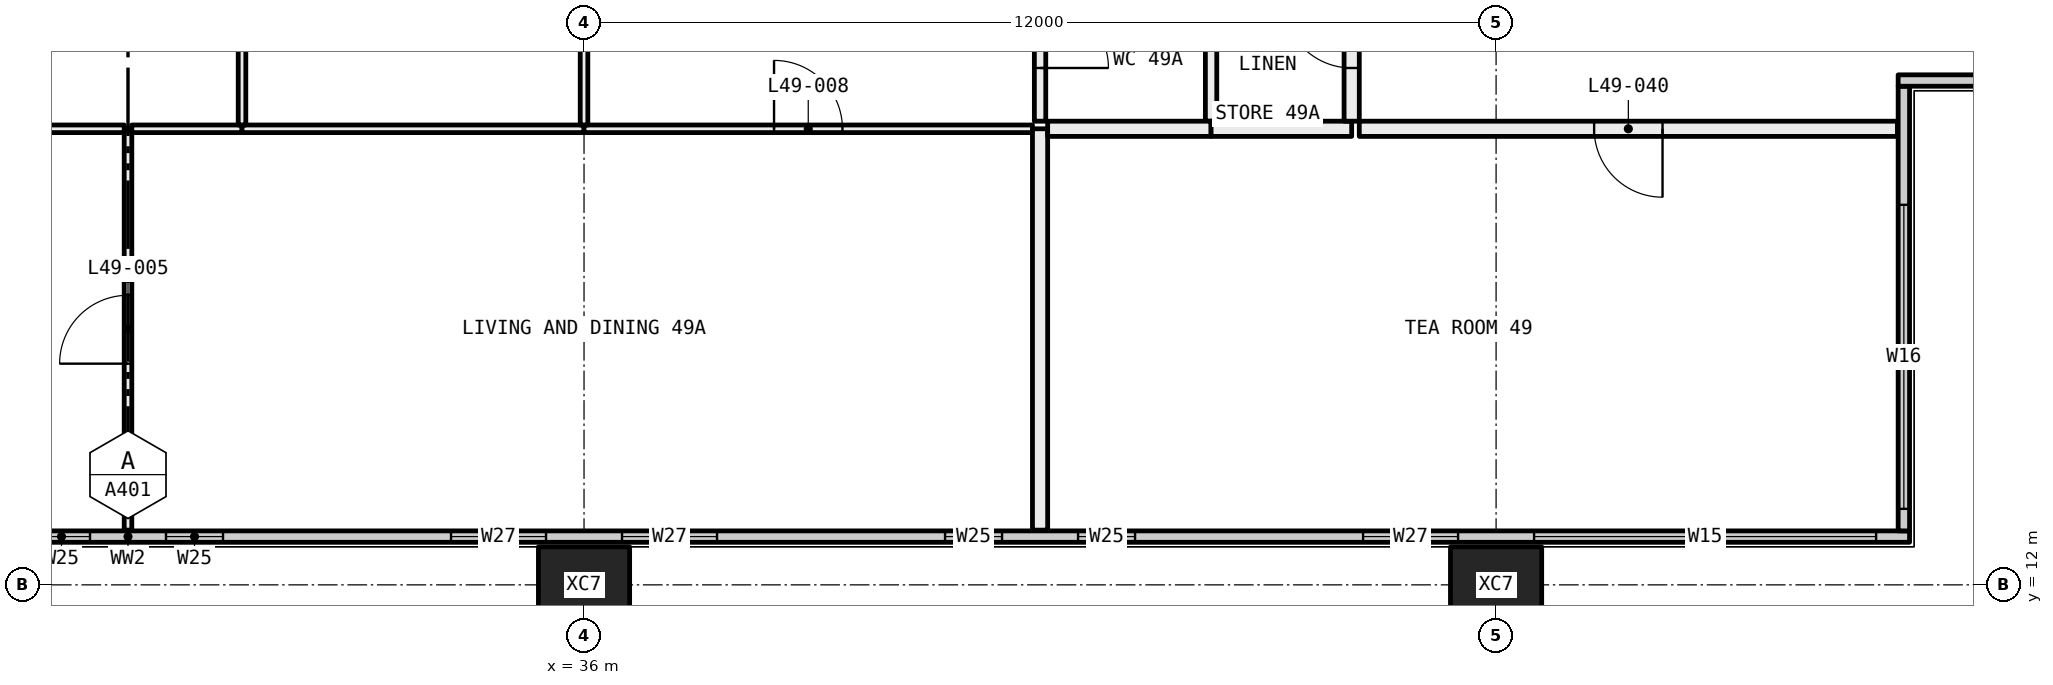
"""IFC4 building model, lengths in metres.
Left out: names, types, materials, properties, quantities, classifications, styles, units other than length and angle.
Written with IfcOpenShell. Run it as: python <this file> out.ifc"""

import sys

from ifc_helpers import new_model, si_unit, direction, frame, frame_2d, origin, origin_2d, place, context, subcontext, project, spatial, rectangle, hollow_rectangle, extrude, element, fill, save


model = new_model("IFC4")
c1 = context("Model", 3, precision=1e-05, world=origin(), true_north=direction((0.0, 1.0)))
c2 = subcontext(c1, "Body", "Model", "MODEL_VIEW")
j1 = project(units=[si_unit("LENGTHUNIT", "METRE"), si_unit("PLANEANGLEUNIT", "RADIAN")], contexts=[c1])
p1 = place(None, origin())
s1 = spatial("IfcSite", under=j1, at=p1, CompositionType="ELEMENT")
p2 = place(p1, origin())
s2 = spatial("IfcBuilding", under=s1, at=p2, CompositionType="ELEMENT")
p3 = place(p2, frame((0.0, 0.0, 185.85)))
s3 = spatial("IfcBuildingStorey", under=s2, at=p3, CompositionType="ELEMENT", Elevation=185.85)
for number, where, z_axis, x_axis in (
    (1, (36.0, 12.0, -0.4), (0.0, 0.0, 1.0), (1.0, 0.0, 0.0)),
    (2, (48.0, 12.0, -0.4), (0.0, 0.0, 1.0), (1.0, 0.0, 0.0)),
):
    element("IfcColumn", number, at=place(p3, frame(where, z_axis=z_axis, x_axis=x_axis)), inside=s3, PredefinedType="COLUMN", context=c2, shape_type="SweptSolid", body=[
        extrude(hollow_rectangle(XDim=1.2, YDim=1.0, WallThickness=0.045, at=origin_2d()), origin(), (0.0, 0.0, 1.0), 3.45),
    ])
p4 = place(p3, frame((6.56, 12.635, 0.0), z_axis=(0.0, 0.0, 1.0), x_axis=(1.0, 0.0, 0.0)))
e3 = element("IfcWall", 3, at=p4, inside=s3, PredefinedType="ELEMENTEDWALL", context=c2, shape_type="SweptSolid", body=[
    extrude(rectangle(XDim=46.88, YDim=0.15, at=frame_2d((23.44, 0.0))), origin(), (0.0, 0.0, 1.0), 3.05),
])
p5 = place(p4, frame((0.44, 0.0, 0.45)))
e4 = element("IfcOpeningElement", 4, at=p5, cuts=e3, PredefinedType="OPENING", context=c2, shape_type="SweptSolid", body=[
    extrude(rectangle(XDim=4.5, YDim=2.55, at=frame_2d((2.25, 1.275))), frame((0.0, 0.085, 0.0), z_axis=(0.0, -1.0, 0.0), x_axis=(1.0, 0.0, 0.0)), (0.0, 0.0, 1.0), 0.17),
])
p6 = place(p4, frame((5.94, 0.0, 0.45)))
e5 = element("IfcOpeningElement", 5, at=p6, cuts=e3, PredefinedType="OPENING", context=c2, shape_type="SweptSolid", body=[
    extrude(rectangle(XDim=1.25, YDim=2.55, at=frame_2d((0.625, 1.275))), frame((0.0, 0.085, 0.0), z_axis=(0.0, -1.0, 0.0), x_axis=(1.0, 0.0, 0.0)), (0.0, 0.0, 1.0), 0.17),
])
p7 = place(p4, frame((10.19, 0.0, 0.45)))
e6 = element("IfcOpeningElement", 6, at=p7, cuts=e3, PredefinedType="OPENING", context=c2, shape_type="SweptSolid", body=[
    extrude(rectangle(XDim=0.75, YDim=2.55, at=frame_2d((0.375, 1.275))), frame((0.0, 0.085, 0.0), z_axis=(0.0, -1.0, 0.0), x_axis=(1.0, 0.0, 0.0)), (0.0, 0.0, 1.0), 0.17),
])
p8 = place(p4, frame((11.94, 0.0, 0.45)))
e7 = element("IfcOpeningElement", 7, at=p8, cuts=e3, PredefinedType="OPENING", context=c2, shape_type="SweptSolid", body=[
    extrude(rectangle(XDim=0.75, YDim=2.55, at=frame_2d((0.375, 1.275))), frame((0.0, 0.085, 0.0), z_axis=(0.0, -1.0, 0.0), x_axis=(1.0, 0.0, 0.0)), (0.0, 0.0, 1.0), 0.17),
])
p9 = place(p4, frame((15.69, 0.0, 0.45)))
e8 = element("IfcOpeningElement", 8, at=p9, cuts=e3, PredefinedType="OPENING", context=c2, shape_type="SweptSolid", body=[
    extrude(rectangle(XDim=1.25, YDim=2.55, at=frame_2d((0.625, 1.275))), frame((0.0, 0.085, 0.0), z_axis=(0.0, -1.0, 0.0), x_axis=(1.0, 0.0, 0.0)), (0.0, 0.0, 1.0), 0.17),
])
p10 = place(p4, frame((17.94, 0.0, 0.45)))
e9 = element("IfcOpeningElement", 9, at=p10, cuts=e3, PredefinedType="OPENING", context=c2, shape_type="SweptSolid", body=[
    extrude(rectangle(XDim=1.25, YDim=2.55, at=frame_2d((0.625, 1.275))), frame((0.0, 0.085, 0.0), z_axis=(0.0, -1.0, 0.0), x_axis=(1.0, 0.0, 0.0)), (0.0, 0.0, 1.0), 0.17),
])
p11 = place(p4, frame((22.19, 0.0, 0.45)))
e10 = element("IfcOpeningElement", 10, at=p11, cuts=e3, PredefinedType="OPENING", context=c2, shape_type="SweptSolid", body=[
    extrude(rectangle(XDim=0.75, YDim=2.55, at=frame_2d((0.375, 1.275))), frame((0.0, 0.085, 0.0), z_axis=(0.0, -1.0, 0.0), x_axis=(1.0, 0.0, 0.0)), (0.0, 0.0, 1.0), 0.17),
])
p12 = place(p4, frame((23.94, 0.0, 0.45)))
e11 = element("IfcOpeningElement", 11, at=p12, cuts=e3, PredefinedType="OPENING", context=c2, shape_type="SweptSolid", body=[
    extrude(rectangle(XDim=0.75, YDim=2.55, at=frame_2d((0.375, 1.275))), frame((0.0, 0.085, 0.0), z_axis=(0.0, -1.0, 0.0), x_axis=(1.0, 0.0, 0.0)), (0.0, 0.0, 1.0), 0.17),
])
p13 = place(p4, frame((27.69, 0.0, 0.45)))
e12 = element("IfcOpeningElement", 12, at=p13, cuts=e3, PredefinedType="OPENING", context=c2, shape_type="SweptSolid", body=[
    extrude(rectangle(XDim=1.25, YDim=2.55, at=frame_2d((0.625, 1.275))), frame((0.0, 0.085, 0.0), z_axis=(0.0, -1.0, 0.0), x_axis=(1.0, 0.0, 0.0)), (0.0, 0.0, 1.0), 0.17),
])
p14 = place(p4, frame((29.94, 0.0, 0.45)))
e13 = element("IfcOpeningElement", 13, at=p14, cuts=e3, PredefinedType="OPENING", context=c2, shape_type="SweptSolid", body=[
    extrude(rectangle(XDim=1.25, YDim=2.55, at=frame_2d((0.625, 1.275))), frame((0.0, 0.085, 0.0), z_axis=(0.0, -1.0, 0.0), x_axis=(1.0, 0.0, 0.0)), (0.0, 0.0, 1.0), 0.17),
])
p15 = place(p4, frame((34.19, 0.0, 0.45)))
e14 = element("IfcOpeningElement", 14, at=p15, cuts=e3, PredefinedType="OPENING", context=c2, shape_type="SweptSolid", body=[
    extrude(rectangle(XDim=0.75, YDim=2.55, at=frame_2d((0.375, 1.275))), frame((0.0, 0.085, 0.0), z_axis=(0.0, -1.0, 0.0), x_axis=(1.0, 0.0, 0.0)), (0.0, 0.0, 1.0), 0.17),
])
p16 = place(p4, frame((35.94, 0.0, 0.45)))
e15 = element("IfcOpeningElement", 15, at=p16, cuts=e3, PredefinedType="OPENING", context=c2, shape_type="SweptSolid", body=[
    extrude(rectangle(XDim=0.75, YDim=2.55, at=frame_2d((0.375, 1.275))), frame((0.0, 0.085, 0.0), z_axis=(0.0, -1.0, 0.0), x_axis=(1.0, 0.0, 0.0)), (0.0, 0.0, 1.0), 0.17),
])
p17 = place(p4, frame((39.69, 0.0, 0.45)))
e16 = element("IfcOpeningElement", 16, at=p17, cuts=e3, PredefinedType="OPENING", context=c2, shape_type="SweptSolid", body=[
    extrude(rectangle(XDim=1.25, YDim=2.55, at=frame_2d((0.625, 1.275))), frame((0.0, 0.085, 0.0), z_axis=(0.0, -1.0, 0.0), x_axis=(1.0, 0.0, 0.0)), (0.0, 0.0, 1.0), 0.17),
])
p18 = place(p4, frame((41.94, 0.0, 0.45)))
e17 = element("IfcOpeningElement", 17, at=p18, cuts=e3, PredefinedType="OPENING", context=c2, shape_type="SweptSolid", body=[
    extrude(rectangle(XDim=4.5, YDim=2.55, at=frame_2d((2.25, 1.275))), frame((0.0, 0.085, 0.0), z_axis=(0.0, -1.0, 0.0), x_axis=(1.0, 0.0, 0.0)), (0.0, 0.0, 1.0), 0.17),
])
p19 = place(p3, frame((53.365, 12.71, 0.0), z_axis=(0.0, 0.0, 1.0), x_axis=(0.0, 1.0, 0.0)))
e18 = element("IfcWall", 18, at=p19, inside=s3, PredefinedType="ELEMENTEDWALL", context=c2, shape_type="SweptSolid", body=[
    extrude(rectangle(XDim=5.85, YDim=0.15, at=frame_2d((2.925, 0.0))), origin(), (0.0, 0.0, 1.0), 3.05),
])
p20 = place(p19, frame((0.29, 0.0, 0.45)))
e19 = element("IfcOpeningElement", 19, at=p20, cuts=e18, PredefinedType="OPENING", context=c2, shape_type="SweptSolid", body=[
    extrude(rectangle(XDim=4.0, YDim=2.55, at=frame_2d((2.0, 1.275))), frame((0.0, 0.085, 0.0), z_axis=(0.0, -1.0, 0.0), x_axis=(1.0, 0.0, 0.0)), (0.0, 0.0, 1.0), 0.17),
])
p21 = place(p3, frame((53.29, 18.635, 0.0), z_axis=(0.0, 0.0, 1.0), x_axis=(1.0, 0.0, 0.0)))
e20 = element("IfcWall", 20, at=p21, inside=s3, PredefinedType="ELEMENTEDWALL", context=c2, shape_type="SweptSolid", body=[
    extrude(rectangle(XDim=6.15, YDim=0.15, at=frame_2d((3.075, 0.0))), origin(), (0.0, 0.0, 1.0), 3.05),
])
p22 = place(p21, frame((1.71, 0.0, 0.45)))
e21 = element("IfcOpeningElement", 21, at=p22, cuts=e20, PredefinedType="OPENING", context=c2, shape_type="SweptSolid", body=[
    extrude(rectangle(XDim=4.0, YDim=2.55, at=frame_2d((2.0, 1.275))), frame((0.0, 0.085, 0.0), z_axis=(0.0, -1.0, 0.0), x_axis=(1.0, 0.0, 0.0)), (0.0, 0.0, 1.0), 0.17),
])
p23 = place(p3, frame((30.0, 12.72, 0.0), z_axis=(0.0, 0.0, 1.0), x_axis=(0.0, 1.0, 0.0)))
e22 = element("IfcWall", 22, at=p23, inside=s3, PredefinedType="PARTITIONING", context=c2, shape_type="SweptSolid", body=[
    extrude(rectangle(XDim=5.28, YDim=0.1, at=frame_2d((2.64, 0.0))), origin(), (0.0, 0.0, 1.0), 3.05),
])
p24 = place(p23, frame((2.19, 0.0, 0.0)))
e23 = element("IfcOpeningElement", 23, at=p24, cuts=e22, PredefinedType="OPENING", context=c2, shape_type="SweptSolid", body=[
    extrude(rectangle(XDim=0.9, YDim=2.1, at=frame_2d((0.45, 1.05))), frame((0.0, 0.06, 0.0), z_axis=(0.0, -1.0, 0.0), x_axis=(1.0, 0.0, 0.0)), (0.0, 0.0, 1.0), 0.12),
])
p25 = place(p3, frame((29.95, 18.0, 0.0), z_axis=(0.0, 0.0, 1.0), x_axis=(-1.0, 0.0, 0.0)))
e24 = element("IfcWall", 24, at=p25, inside=s3, PredefinedType="PARTITIONING", context=c2, shape_type="SweptSolid", body=[
    extrude(rectangle(XDim=3.95, YDim=0.1, at=frame_2d((1.975, 0.0))), origin(), (0.0, 0.0, 1.0), 3.05),
])
p26 = place(p25, frame((1.525, 0.0, 0.0)))
e25 = element("IfcOpeningElement", 25, at=p26, cuts=e24, PredefinedType="OPENING", context=c2, shape_type="SweptSolid", body=[
    extrude(rectangle(XDim=0.9, YDim=2.1, at=frame_2d((0.45, 1.05))), frame((0.0, 0.06, 0.0), z_axis=(0.0, -1.0, 0.0), x_axis=(1.0, 0.0, 0.0)), (0.0, 0.0, 1.0), 0.12),
])
p27 = place(p3, frame((31.5, 18.0, 0.0), z_axis=(0.0, 0.0, 1.0), x_axis=(-1.0, 0.0, 0.0)))
e26 = element("IfcWall", 26, at=p27, inside=s3, PredefinedType="PARTITIONING", context=c2, shape_type="SweptSolid", body=[
    extrude(rectangle(XDim=1.45, YDim=0.1, at=frame_2d((0.725, 0.0))), origin(), (0.0, 0.0, 1.0), 3.05),
])
p28 = place(p3, frame((36.0, 18.0, 0.0), z_axis=(0.0, 0.0, 1.0), x_axis=(-1.0, 0.0, 0.0)))
e27 = element("IfcWall", 27, at=p28, inside=s3, PredefinedType="PARTITIONING", context=c2, shape_type="SweptSolid", body=[
    extrude(rectangle(XDim=4.5, YDim=0.1, at=frame_2d((2.25, 0.0))), origin(), (0.0, 0.0, 1.0), 2.45),
])
p29 = place(p3, frame((41.9, 18.0, 0.0), z_axis=(0.0, 0.0, 1.0), x_axis=(-1.0, 0.0, 0.0)))
e28 = element("IfcWall", 28, at=p29, inside=s3, PredefinedType="PARTITIONING", context=c2, shape_type="SweptSolid", body=[
    extrude(rectangle(XDim=5.9, YDim=0.1, at=frame_2d((2.95, 0.0))), origin(), (0.0, 0.0, 1.0), 2.45),
])
p30 = place(p29, frame((2.5, 0.0, 0.0)))
e29 = element("IfcOpeningElement", 29, at=p30, cuts=e28, PredefinedType="OPENING", context=c2, shape_type="SweptSolid", body=[
    extrude(rectangle(XDim=0.9, YDim=2.1, at=frame_2d((0.45, 1.05))), frame((0.0, 0.06, 0.0), z_axis=(0.0, -1.0, 0.0), x_axis=(1.0, 0.0, 0.0)), (0.0, 0.0, 1.0), 0.12),
])
p31 = place(p3, frame((42.0, 12.72, 0.0), z_axis=(0.0, 0.0, 1.0), x_axis=(0.0, 1.0, 0.0)))
e30 = element("IfcWall", 30, at=p31, inside=s3, PredefinedType="PARTITIONING", context=c2, shape_type="SweptSolid", body=[
    extrude(rectangle(XDim=5.28, YDim=0.2, at=frame_2d((2.64, 0.0))), origin(), (0.0, 0.0, 1.0), 3.05),
])
p32 = place(p3, frame((31.5, 18.05, 0.0), z_axis=(0.0, 0.0, 1.0), x_axis=(0.0, 1.0, 0.0)))
e31 = element("IfcWall", 31, at=p32, inside=s3, PredefinedType="PARTITIONING", context=c2, shape_type="SweptSolid", body=[
    extrude(rectangle(XDim=6.25, YDim=0.1, at=frame_2d((3.125, 0.0))), origin(), (0.0, 0.0, 1.0), 2.45),
])
p33 = place(p32, frame((2.675, 0.0, 0.0)))
e32 = element("IfcOpeningElement", 32, at=p33, cuts=e31, PredefinedType="OPENING", context=c2, shape_type="SweptSolid", body=[
    extrude(rectangle(XDim=0.9, YDim=2.1, at=frame_2d((0.45, 1.05))), frame((0.0, 0.06, 0.0), z_axis=(0.0, -1.0, 0.0), x_axis=(1.0, 0.0, 0.0)), (0.0, 0.0, 1.0), 0.12),
])
p34 = place(p3, frame((36.0, 18.05, 0.0), z_axis=(0.0, 0.0, 1.0), x_axis=(0.0, 1.0, 0.0)))
e33 = element("IfcWall", 33, at=p34, inside=s3, PredefinedType="PARTITIONING", context=c2, shape_type="SweptSolid", body=[
    extrude(rectangle(XDim=5.3, YDim=0.1, at=frame_2d((2.65, 0.0))), origin(), (0.0, 0.0, 1.0), 2.45),
])
p35 = place(p3, frame((42.0, 18.1, 0.0), z_axis=(0.0, 0.0, 1.0), x_axis=(0.0, 1.0, 0.0)))
e34 = element("IfcWall", 34, at=p35, inside=s3, PredefinedType="PARTITIONING", context=c2, shape_type="SweptSolid", body=[
    extrude(rectangle(XDim=2.3, YDim=0.15, at=frame_2d((1.15, 0.0))), origin(), (0.0, 0.0, 1.0), 3.05),
])
p36 = place(p35, frame((0.7, 0.0, 0.0)))
e35 = element("IfcOpeningElement", 35, at=p36, cuts=e34, PredefinedType="OPENING", context=c2, shape_type="SweptSolid", body=[
    extrude(rectangle(XDim=0.9, YDim=2.1, at=frame_2d((0.45, 1.05))), frame((0.0, 0.085, 0.0), z_axis=(0.0, -1.0, 0.0), x_axis=(1.0, 0.0, 0.0)), (0.0, 0.0, 1.0), 0.17),
])
p37 = place(p3, frame((44.25, 18.1, 0.0), z_axis=(0.0, 0.0, 1.0), x_axis=(0.0, 1.0, 0.0)))
e36 = element("IfcWall", 36, at=p37, inside=s3, PredefinedType="PARTITIONING", context=c2, shape_type="SweptSolid", body=[
    extrude(rectangle(XDim=2.3, YDim=0.15, at=frame_2d((1.15, 0.0))), origin(), (0.0, 0.0, 1.0), 3.05),
])
p38 = place(p3, frame((42.1, 18.0, 0.0), z_axis=(0.0, 0.0, 1.0), x_axis=(1.0, 0.0, 0.0)))
e37 = element("IfcWall", 37, at=p38, inside=s3, PredefinedType="PARTITIONING", context=c2, shape_type="SweptSolid", body=[
    extrude(rectangle(XDim=2.15, YDim=0.2, at=frame_2d((1.075, 0.0))), origin(), (0.0, 0.0, 1.0), 3.05),
])
p39 = place(p3, frame((44.25, 18.0, 0.0), z_axis=(0.0, 0.0, 1.0), x_axis=(1.0, 0.0, 0.0)))
e38 = element("IfcWall", 38, at=p39, inside=s3, PredefinedType="PARTITIONING", context=c2, shape_type="SweptSolid", body=[
    extrude(rectangle(XDim=1.85, YDim=0.2, at=frame_2d((0.925, 0.0))), origin(), (0.0, 0.0, 1.0), 3.05),
])
p40 = place(p3, frame((46.1, 18.1, 0.0), z_axis=(0.0, 0.0, 1.0), x_axis=(0.0, 1.0, 0.0)))
e39 = element("IfcWall", 39, at=p40, inside=s3, PredefinedType="PARTITIONING", context=c2, shape_type="SweptSolid", body=[
    extrude(rectangle(XDim=2.3, YDim=0.2, at=frame_2d((1.15, 0.0))), origin(), (0.0, 0.0, 1.0), 3.05),
])
p41 = place(p40, frame((0.7, 0.0, 0.0)))
e40 = element("IfcOpeningElement", 40, at=p41, cuts=e39, PredefinedType="OPENING", context=c2, shape_type="SweptSolid", body=[
    extrude(rectangle(XDim=0.9, YDim=2.1, at=frame_2d((0.45, 1.05))), frame((0.0, 0.11, 0.0), z_axis=(0.0, -1.0, 0.0), x_axis=(1.0, 0.0, 0.0)), (0.0, 0.0, 1.0), 0.22),
])
p42 = place(p3, frame((53.28, 18.0, 0.0), z_axis=(0.0, 0.0, 1.0), x_axis=(-1.0, 0.0, 0.0)))
e41 = element("IfcWall", 41, at=p42, inside=s3, PredefinedType="PARTITIONING", context=c2, shape_type="SweptSolid", body=[
    extrude(rectangle(XDim=7.08, YDim=0.2, at=frame_2d((3.54, 0.0))), origin(), (0.0, 0.0, 1.0), 3.05),
])
p43 = place(p42, frame((3.09, 0.0, 0.0)))
e42 = element("IfcOpeningElement", 42, at=p43, cuts=e41, PredefinedType="OPENING", context=c2, shape_type="SweptSolid", body=[
    extrude(rectangle(XDim=0.9, YDim=2.1, at=frame_2d((0.45, 1.05))), frame((0.0, 0.11, 0.0), z_axis=(0.0, -1.0, 0.0), x_axis=(1.0, 0.0, 0.0)), (0.0, 0.0, 1.0), 0.22),
])
p44 = place(p11, origin())
e43 = element("IfcWindow", 43, at=p44, inside=s3, PartitioningType="SINGLE_PANEL", PredefinedType="WINDOW", context=c2, shape_type="SweptSolid", body=[
    extrude(rectangle(XDim=0.75, YDim=2.55, at=frame_2d((0.375, 1.275))), frame((0.0, 0.03, 0.0), z_axis=(0.0, -1.0, 0.0), x_axis=(1.0, 0.0, 0.0)), (0.0, 0.0, 1.0), 0.06),
])
fill(e10, e43)
p45 = place(p12, origin())
e44 = element("IfcWindow", 44, at=p45, inside=s3, PartitioningType="SINGLE_PANEL", PredefinedType="WINDOW", context=c2, shape_type="SweptSolid", body=[
    extrude(rectangle(XDim=0.75, YDim=2.55, at=frame_2d((0.375, 1.275))), frame((0.0, 0.03, 0.0), z_axis=(0.0, -1.0, 0.0), x_axis=(1.0, 0.0, 0.0)), (0.0, 0.0, 1.0), 0.06),
])
fill(e11, e44)
p46 = place(p13, origin())
e45 = element("IfcWindow", 45, at=p46, inside=s3, PartitioningType="SINGLE_PANEL", PredefinedType="WINDOW", context=c2, shape_type="SweptSolid", body=[
    extrude(rectangle(XDim=1.25, YDim=2.55, at=frame_2d((0.625, 1.275))), frame((0.0, 0.03, 0.0), z_axis=(0.0, -1.0, 0.0), x_axis=(1.0, 0.0, 0.0)), (0.0, 0.0, 1.0), 0.06),
])
fill(e12, e45)
p47 = place(p14, origin())
e46 = element("IfcWindow", 46, at=p47, inside=s3, PartitioningType="SINGLE_PANEL", PredefinedType="WINDOW", context=c2, shape_type="SweptSolid", body=[
    extrude(rectangle(XDim=1.25, YDim=2.55, at=frame_2d((0.625, 1.275))), frame((0.0, 0.03, 0.0), z_axis=(0.0, -1.0, 0.0), x_axis=(1.0, 0.0, 0.0)), (0.0, 0.0, 1.0), 0.06),
])
fill(e13, e46)
p48 = place(p15, origin())
e47 = element("IfcWindow", 47, at=p48, inside=s3, PartitioningType="SINGLE_PANEL", PredefinedType="WINDOW", context=c2, shape_type="SweptSolid", body=[
    extrude(rectangle(XDim=0.75, YDim=2.55, at=frame_2d((0.375, 1.275))), frame((0.0, 0.03, 0.0), z_axis=(0.0, -1.0, 0.0), x_axis=(1.0, 0.0, 0.0)), (0.0, 0.0, 1.0), 0.06),
])
fill(e14, e47)
p49 = place(p16, origin())
e48 = element("IfcWindow", 48, at=p49, inside=s3, PartitioningType="SINGLE_PANEL", PredefinedType="WINDOW", context=c2, shape_type="SweptSolid", body=[
    extrude(rectangle(XDim=0.75, YDim=2.55, at=frame_2d((0.375, 1.275))), frame((0.0, 0.03, 0.0), z_axis=(0.0, -1.0, 0.0), x_axis=(1.0, 0.0, 0.0)), (0.0, 0.0, 1.0), 0.06),
])
fill(e15, e48)
p50 = place(p17, origin())
e49 = element("IfcWindow", 49, at=p50, inside=s3, PartitioningType="SINGLE_PANEL", PredefinedType="WINDOW", context=c2, shape_type="SweptSolid", body=[
    extrude(rectangle(XDim=1.25, YDim=2.55, at=frame_2d((0.625, 1.275))), frame((0.0, 0.03, 0.0), z_axis=(0.0, -1.0, 0.0), x_axis=(1.0, 0.0, 0.0)), (0.0, 0.0, 1.0), 0.06),
])
fill(e16, e49)
p51 = place(p18, origin())
e50 = element("IfcWindow", 50, at=p51, inside=s3, PartitioningType="SINGLE_PANEL", PredefinedType="WINDOW", context=c2, shape_type="SweptSolid", body=[
    extrude(rectangle(XDim=4.5, YDim=2.55, at=frame_2d((2.25, 1.275))), frame((0.0, 0.03, 0.0), z_axis=(0.0, -1.0, 0.0), x_axis=(1.0, 0.0, 0.0)), (0.0, 0.0, 1.0), 0.06),
])
fill(e17, e50)
p52 = place(p20, origin())
e51 = element("IfcWindow", 51, at=p52, inside=s3, PartitioningType="SINGLE_PANEL", PredefinedType="WINDOW", context=c2, shape_type="SweptSolid", body=[
    extrude(rectangle(XDim=4.0, YDim=2.55, at=frame_2d((2.0, 1.275))), frame((0.0, 0.03, 0.0), z_axis=(0.0, -1.0, 0.0), x_axis=(1.0, 0.0, 0.0)), (0.0, 0.0, 1.0), 0.06),
])
fill(e19, e51)
p53 = place(p24, origin())
e52 = element("IfcDoor", 52, at=p53, inside=s3, OperationType="SINGLE_SWING_RIGHT", PredefinedType="DOOR", context=c2, shape_type="SweptSolid", body=[
    extrude(rectangle(XDim=0.9, YDim=2.1, at=frame_2d((0.45, 1.05))), frame((0.0, 0.025, 0.0), z_axis=(0.0, -1.0, 0.0), x_axis=(1.0, 0.0, 0.0)), (0.0, 0.0, 1.0), 0.05),
])
fill(e23, e52)
p54 = place(p30, frame((0.9, 0.0, 0.0), x_axis=(-1.0, 0.0, 0.0)))
e53 = element("IfcDoor", 53, at=p54, inside=s3, OperationType="SINGLE_SWING_RIGHT", PredefinedType="DOOR", context=c2, shape_type="SweptSolid", body=[
    extrude(rectangle(XDim=0.9, YDim=2.1, at=frame_2d((0.45, 1.05))), frame((0.0, 0.025, 0.0), z_axis=(0.0, -1.0, 0.0), x_axis=(1.0, 0.0, 0.0)), (0.0, 0.0, 1.0), 0.05),
])
fill(e29, e53)
p55 = place(p36, frame((0.9, 0.0, 0.0), x_axis=(-1.0, 0.0, 0.0)))
e54 = element("IfcDoor", 54, at=p55, inside=s3, OperationType="SINGLE_SWING_LEFT", PredefinedType="DOOR", context=c2, shape_type="SweptSolid", body=[
    extrude(rectangle(XDim=0.9, YDim=2.1, at=frame_2d((0.45, 1.05))), frame((0.0, 0.025, 0.0), z_axis=(0.0, -1.0, 0.0), x_axis=(1.0, 0.0, 0.0)), (0.0, 0.0, 1.0), 0.05),
])
fill(e35, e54)
p56 = place(p41, origin())
e55 = element("IfcDoor", 55, at=p56, inside=s3, OperationType="SINGLE_SWING_LEFT", PredefinedType="DOOR", context=c2, shape_type="SweptSolid", body=[
    extrude(rectangle(XDim=0.9, YDim=2.1, at=frame_2d((0.45, 1.05))), frame((0.0, 0.025, 0.0), z_axis=(0.0, -1.0, 0.0), x_axis=(1.0, 0.0, 0.0)), (0.0, 0.0, 1.0), 0.05),
])
fill(e40, e55)
p57 = place(p43, origin())
e56 = element("IfcDoor", 56, at=p57, inside=s3, OperationType="SINGLE_SWING_RIGHT", PredefinedType="DOOR", context=c2, shape_type="SweptSolid", body=[
    extrude(rectangle(XDim=0.9, YDim=2.1, at=frame_2d((0.45, 1.05))), frame((0.0, 0.025, 0.0), z_axis=(0.0, -1.0, 0.0), x_axis=(1.0, 0.0, 0.0)), (0.0, 0.0, 1.0), 0.05),
])
fill(e42, e56)
save(model, sys.argv[1])
